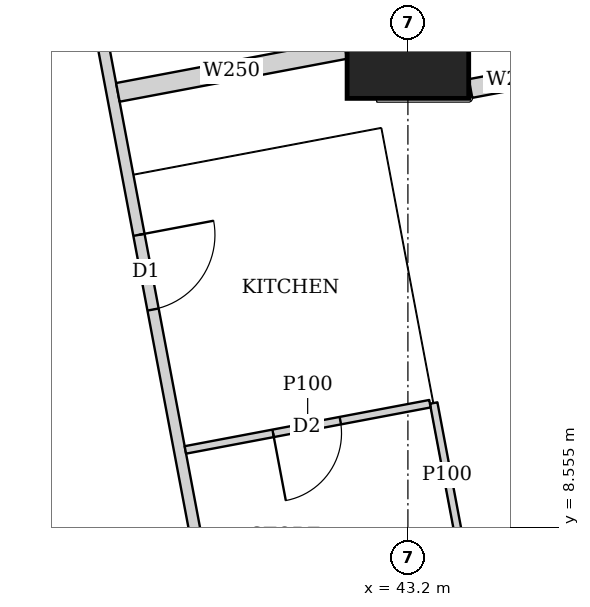
"""IFC4 building model, lengths in metres.
Left out: names, types, materials, properties, quantities, classifications, styles, units other than length and angle.
Written with IfcOpenShell. Run it as: python <this file> out.ifc"""

import sys

from ifc_helpers import new_model, si_unit, direction, frame, frame_2d, origin, origin_2d, place, context, subcontext, project, spatial, rectangle, extrude, element, fill, save


model = new_model("IFC4")
c1 = context("Model", 3, precision=1e-05, world=origin(), true_north=direction((0.0, 1.0)))
c2 = subcontext(c1, "Body", "Model", "MODEL_VIEW")
j1 = project(units=[si_unit("LENGTHUNIT", "METRE"), si_unit("PLANEANGLEUNIT", "RADIAN")], contexts=[c1])
p1 = place(None, origin())
s1 = spatial("IfcSite", under=j1, at=p1, CompositionType="ELEMENT")
p2 = place(p1, origin())
s2 = spatial("IfcBuilding", under=s1, at=p2, CompositionType="ELEMENT")
p3 = place(p2, frame((0.0, 0.0, 100.4)))
s3 = spatial("IfcBuildingStorey", under=s2, at=p3, CompositionType="ELEMENT", Elevation=100.4)
p4 = place(p3, frame((43.2, 15.0, 0.0), z_axis=(0.0, 0.0, 1.0), x_axis=(1.0, 0.0, 0.0)))
e1 = element("IfcColumn", 1, at=p4, inside=s3, PredefinedType="COLUMN", context=c2, shape_type="SweptSolid", body=[
    extrude(rectangle(XDim=1.6, YDim=1.6, at=origin_2d()), origin(), (0.0, 0.0, 1.0), 3.75),
])
p5 = place(p3, frame((50.653, 2.703, 0.0), z_axis=(0.0, 0.0, 1.0), x_axis=(-0.185612026696, 0.982623109613, 0.0)))
e2 = element("IfcWall", 2, at=p5, inside=s3, PredefinedType="SOLIDWALL", context=c2, shape_type="SweptSolid", body=[
    extrude(rectangle(XDim=41.393, YDim=0.2, at=frame_2d((20.697, 0.0))), origin(), (0.0, 0.0, 1.0), 3.5),
])
p6 = place(p5, frame((1.633, 0.0, 0.9)))
e3 = element("IfcOpeningElement", 3, at=p6, cuts=e2, PredefinedType="OPENING", context=c2, shape_type="SweptSolid", body=[
    extrude(rectangle(XDim=1.8, YDim=1.5, at=frame_2d((0.9, 0.75))), frame((0.0, 0.11, 0.0), z_axis=(0.0, -1.0, 0.0), x_axis=(1.0, 0.0, 0.0)), (0.0, 0.0, 1.0), 0.22),
])
p7 = place(p5, frame((6.032, 0.0, 0.9)))
e4 = element("IfcOpeningElement", 4, at=p7, cuts=e2, PredefinedType="OPENING", context=c2, shape_type="SweptSolid", body=[
    extrude(rectangle(XDim=1.8, YDim=1.5, at=frame_2d((0.9, 0.75))), frame((0.0, 0.11, 0.0), z_axis=(0.0, -1.0, 0.0), x_axis=(1.0, 0.0, 0.0)), (0.0, 0.0, 1.0), 0.22),
])
p8 = place(p5, frame((9.848, 0.0, 0.9)))
e5 = element("IfcOpeningElement", 5, at=p8, cuts=e2, PredefinedType="OPENING", context=c2, shape_type="SweptSolid", body=[
    extrude(rectangle(XDim=1.8, YDim=1.5, at=frame_2d((0.9, 0.75))), frame((0.0, 0.11, 0.0), z_axis=(0.0, -1.0, 0.0), x_axis=(1.0, 0.0, 0.0)), (0.0, 0.0, 1.0), 0.22),
])
p9 = place(p5, frame((13.664, 0.0, 0.9)))
e6 = element("IfcOpeningElement", 6, at=p9, cuts=e2, PredefinedType="OPENING", context=c2, shape_type="SweptSolid", body=[
    extrude(rectangle(XDim=1.8, YDim=1.5, at=frame_2d((0.9, 0.75))), frame((0.0, 0.11, 0.0), z_axis=(0.0, -1.0, 0.0), x_axis=(1.0, 0.0, 0.0)), (0.0, 0.0, 1.0), 0.22),
])
p10 = place(p5, frame((17.481, 0.0, 0.9)))
e7 = element("IfcOpeningElement", 7, at=p10, cuts=e2, PredefinedType="OPENING", context=c2, shape_type="SweptSolid", body=[
    extrude(rectangle(XDim=1.8, YDim=1.5, at=frame_2d((0.9, 0.75))), frame((0.0, 0.11, 0.0), z_axis=(0.0, -1.0, 0.0), x_axis=(1.0, 0.0, 0.0)), (0.0, 0.0, 1.0), 0.22),
])
p11 = place(p5, frame((21.297, 0.0, 0.9)))
e8 = element("IfcOpeningElement", 8, at=p11, cuts=e2, PredefinedType="OPENING", context=c2, shape_type="SweptSolid", body=[
    extrude(rectangle(XDim=1.8, YDim=1.5, at=frame_2d((0.9, 0.75))), frame((0.0, 0.11, 0.0), z_axis=(0.0, -1.0, 0.0), x_axis=(1.0, 0.0, 0.0)), (0.0, 0.0, 1.0), 0.22),
])
p12 = place(p5, frame((25.113, 0.0, 0.9)))
e9 = element("IfcOpeningElement", 9, at=p12, cuts=e2, PredefinedType="OPENING", context=c2, shape_type="SweptSolid", body=[
    extrude(rectangle(XDim=1.8, YDim=1.5, at=frame_2d((0.9, 0.75))), frame((0.0, 0.11, 0.0), z_axis=(0.0, -1.0, 0.0), x_axis=(1.0, 0.0, 0.0)), (0.0, 0.0, 1.0), 0.22),
])
p13 = place(p5, frame((28.93, 0.0, 0.9)))
e10 = element("IfcOpeningElement", 10, at=p13, cuts=e2, PredefinedType="OPENING", context=c2, shape_type="SweptSolid", body=[
    extrude(rectangle(XDim=1.8, YDim=1.5, at=frame_2d((0.9, 0.75))), frame((0.0, 0.11, 0.0), z_axis=(0.0, -1.0, 0.0), x_axis=(1.0, 0.0, 0.0)), (0.0, 0.0, 1.0), 0.22),
])
p14 = place(p5, frame((32.746, 0.0, 0.9)))
e11 = element("IfcOpeningElement", 11, at=p14, cuts=e2, PredefinedType="OPENING", context=c2, shape_type="SweptSolid", body=[
    extrude(rectangle(XDim=1.8, YDim=1.5, at=frame_2d((0.9, 0.75))), frame((0.0, 0.11, 0.0), z_axis=(0.0, -1.0, 0.0), x_axis=(1.0, 0.0, 0.0)), (0.0, 0.0, 1.0), 0.22),
])
p15 = place(p5, frame((36.481, 0.0, 0.9)))
e12 = element("IfcOpeningElement", 12, at=p15, cuts=e2, PredefinedType="OPENING", context=c2, shape_type="SweptSolid", body=[
    extrude(rectangle(XDim=1.8, YDim=1.5, at=frame_2d((0.9, 0.75))), frame((0.0, 0.11, 0.0), z_axis=(0.0, -1.0, 0.0), x_axis=(1.0, 0.0, 0.0)), (0.0, 0.0, 1.0), 0.22),
])
p16 = place(p3, frame((33.382, 45.65, 0.0), z_axis=(0.0, 0.0, 1.0), x_axis=(0.185593544777, -0.982626600565, 0.0)))
e13 = element("IfcWall", 13, at=p16, inside=s3, PredefinedType="SOLIDWALL", context=c2, shape_type="SweptSolid", body=[
    extrude(rectangle(XDim=47.118, YDim=0.15, at=frame_2d((23.559, 0.0))), origin(), (0.0, 0.0, 1.0), 2.2),
])
p17 = place(p16, frame((10.662, 0.0, 0.0)))
e14 = element("IfcOpeningElement", 14, at=p17, cuts=e13, PredefinedType="OPENING", context=c2, shape_type="SweptSolid", body=[
    extrude(rectangle(XDim=1.0, YDim=2.1, at=frame_2d((0.5, 1.05))), frame((0.0, 0.085, 0.0), z_axis=(0.0, -1.0, 0.0), x_axis=(1.0, 0.0, 0.0)), (0.0, 0.0, 1.0), 0.17),
])
p18 = place(p16, frame((15.237, 0.0, 0.0)))
e15 = element("IfcOpeningElement", 15, at=p18, cuts=e13, PredefinedType="OPENING", context=c2, shape_type="SweptSolid", body=[
    extrude(rectangle(XDim=1.0, YDim=2.1, at=frame_2d((0.5, 1.05))), frame((0.0, 0.085, 0.0), z_axis=(0.0, -1.0, 0.0), x_axis=(1.0, 0.0, 0.0)), (0.0, 0.0, 1.0), 0.17),
])
p19 = place(p16, frame((27.341, 0.0, 0.0)))
e16 = element("IfcOpeningElement", 16, at=p19, cuts=e13, PredefinedType="OPENING", context=c2, shape_type="SweptSolid", body=[
    extrude(rectangle(XDim=1.0, YDim=2.1, at=frame_2d((0.5, 1.05))), frame((0.0, 0.085, 0.0), z_axis=(0.0, -1.0, 0.0), x_axis=(1.0, 0.0, 0.0)), (0.0, 0.0, 1.0), 0.17),
])
p20 = place(p16, frame((33.833, 0.0, 0.0)))
e17 = element("IfcOpeningElement", 17, at=p20, cuts=e13, PredefinedType="OPENING", context=c2, shape_type="SweptSolid", body=[
    extrude(rectangle(XDim=1.0, YDim=2.1, at=frame_2d((0.5, 1.05))), frame((0.0, 0.085, 0.0), z_axis=(0.0, -1.0, 0.0), x_axis=(1.0, 0.0, 0.0)), (0.0, 0.0, 1.0), 0.17),
])
p21 = place(p3, frame((43.539, 10.192, 0.0), z_axis=(0.0, 0.0, 1.0), x_axis=(0.185366049966, -0.982669541362, 0.0)))
e18 = element("IfcWall", 18, at=p21, inside=s3, PredefinedType="PARTITIONING", context=c2, shape_type="SweptSolid", body=[
    extrude(rectangle(XDim=1.915, YDim=0.1, at=frame_2d((0.958, 0.0))), origin(), (0.0, 0.0, 1.0), 3.5),
])
p22 = place(p3, frame((43.49, 10.183, 0.0), z_axis=(0.0, 0.0, 1.0), x_axis=(-0.982607026909, -0.185697147715, 0.0)))
e19 = element("IfcWall", 19, at=p22, inside=s3, PredefinedType="PARTITIONING", context=c2, shape_type="SweptSolid", body=[
    extrude(rectangle(XDim=3.275, YDim=0.1, at=frame_2d((1.637, 0.0))), origin(), (0.0, 0.0, 1.0), 3.5),
])
p23 = place(p22, frame((1.2, 0.0, 0.0)))
e20 = element("IfcOpeningElement", 20, at=p23, cuts=e19, PredefinedType="OPENING", context=c2, shape_type="SweptSolid", body=[
    extrude(rectangle(XDim=0.9, YDim=2.1, at=frame_2d((0.45, 1.05))), frame((0.0, 0.06, 0.0), z_axis=(0.0, -1.0, 0.0), x_axis=(1.0, 0.0, 0.0)), (0.0, 0.0, 1.0), 0.12),
])
p24 = place(p3, frame((45.19, 14.55, 0.0), z_axis=(0.0, 0.0, 1.0), x_axis=(-0.982666604435, -0.185381618634, 0.0)))
e21 = element("IfcWall", 21, at=p24, inside=s3, PredefinedType="SOLIDWALL", context=c2, shape_type="SweptSolid", body=[
    extrude(rectangle(XDim=1.187, YDim=0.25, at=frame_2d((0.593, 0.0))), origin(), (0.0, 0.0, 1.0), 3.5),
])
p25 = place(p3, frame((42.376, 14.844, 0.0), z_axis=(0.0, 0.0, 1.0), x_axis=(-0.982636286056, -0.185542257522, 0.0)))
e22 = element("IfcWall", 22, at=p25, inside=s3, PredefinedType="SOLIDWALL", context=c2, shape_type="SweptSolid", body=[
    extrude(rectangle(XDim=3.045, YDim=0.25, at=frame_2d((1.522, 0.0))), origin(), (0.0, 0.0, 1.0), 3.5),
])
p26 = place(p20, origin())
e23 = element("IfcDoor", 23, at=p26, inside=s3, OperationType="SINGLE_SWING_LEFT", PredefinedType="DOOR", context=c2, shape_type="SweptSolid", body=[
    extrude(rectangle(XDim=1.0, YDim=2.1, at=frame_2d((0.5, 1.05))), frame((0.0, 0.025, 0.0), z_axis=(0.0, -1.0, 0.0), x_axis=(1.0, 0.0, 0.0)), (0.0, 0.0, 1.0), 0.05),
])
fill(e17, e23)
p27 = place(p23, origin())
e24 = element("IfcDoor", 24, at=p27, inside=s3, OperationType="SINGLE_SWING_RIGHT", PredefinedType="DOOR", context=c2, shape_type="SweptSolid", body=[
    extrude(rectangle(XDim=0.9, YDim=2.1, at=frame_2d((0.45, 1.05))), frame((0.0, 0.025, 0.0), z_axis=(0.0, -1.0, 0.0), x_axis=(1.0, 0.0, 0.0)), (0.0, 0.0, 1.0), 0.05),
])
fill(e20, e24)
save(model, sys.argv[1])
